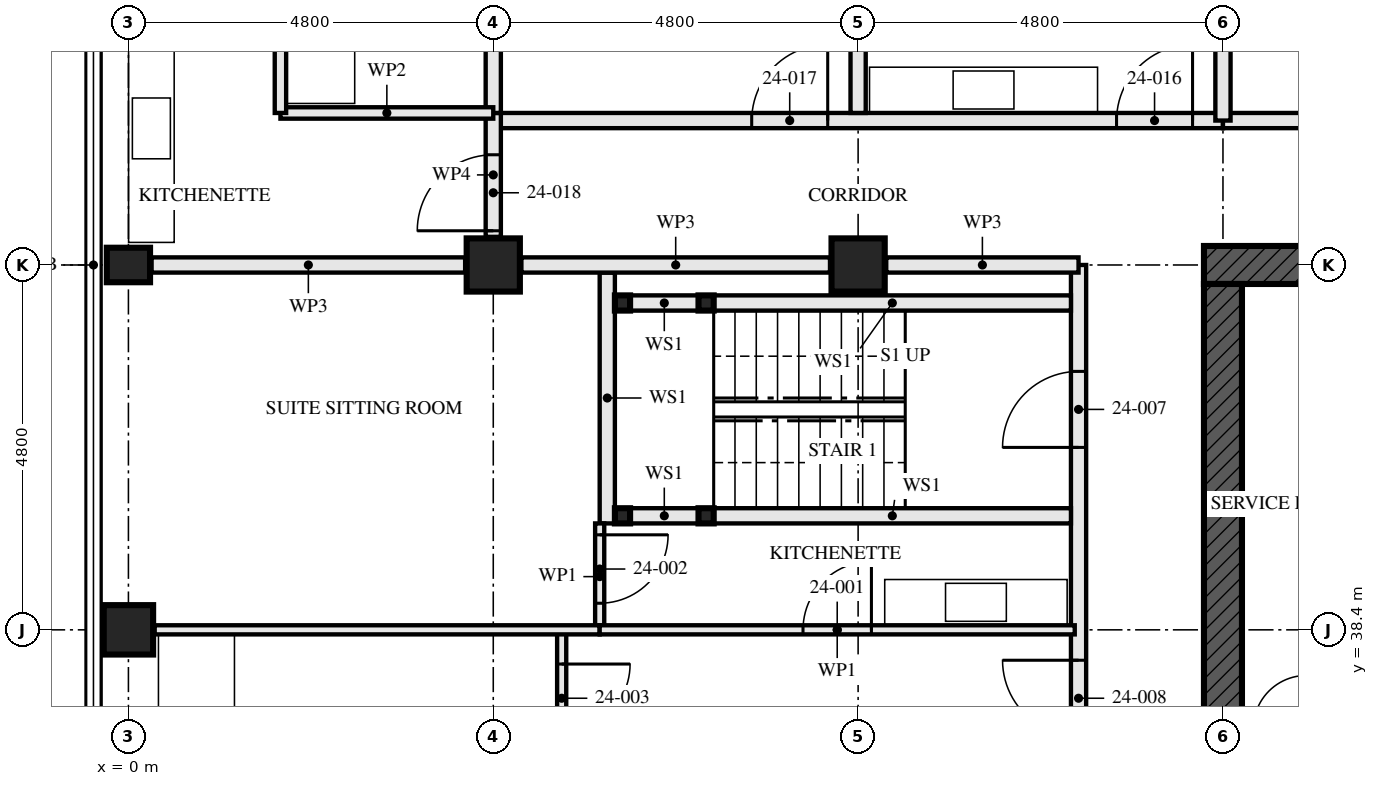
"""IFC4 building model, lengths in metres.
Left out: names, types, materials, properties, quantities, classifications, styles, units other than length and angle.
Written with IfcOpenShell. Run it as: python <this file> out.ifc"""

import sys

from ifc_helpers import new_model, si_unit, direction, frame, frame_2d, origin, origin_2d, place, context, subcontext, project, spatial, rectangle, hollow_rectangle, i_section, extrude, element, fill, save


model = new_model("IFC4")
c1 = context("Model", 3, precision=1e-05, world=origin(), true_north=direction((0.0, 1.0)))
c2 = subcontext(c1, "Body", "Model", "MODEL_VIEW")
j1 = project(units=[si_unit("LENGTHUNIT", "METRE"), si_unit("PLANEANGLEUNIT", "RADIAN")], contexts=[c1])
p1 = place(None, origin())
s1 = spatial("IfcSite", under=j1, at=p1, CompositionType="ELEMENT")
p2 = place(p1, origin())
s2 = spatial("IfcBuilding", under=s1, at=p2, CompositionType="ELEMENT")
p3 = place(p2, frame((0.0, 0.0, 91.0)))
s3 = spatial("IfcBuildingStorey", under=s2, at=p3, CompositionType="ELEMENT", Elevation=91.0)
p4 = place(p3, frame((0.0, 38.4, 0.0), z_axis=(0.0, 0.0, 1.0), x_axis=(1.0, 0.0, 0.0)))
e1 = element("IfcColumn", 1, at=p4, inside=s3, PredefinedType="COLUMN", context=c2, shape_type="SweptSolid", body=[
    extrude(hollow_rectangle(XDim=0.65, YDim=0.65, WallThickness=0.08, at=origin_2d()), origin(), (0.0, 0.0, 1.0), 3.5),
])
p5 = place(p3, frame((0.0, 43.2, 0.0), z_axis=(0.0, 0.0, 1.0), x_axis=(0.0, 1.0, 0.0)))
e2 = element("IfcColumn", 2, at=p5, inside=s3, PredefinedType="COLUMN", context=c2, shape_type="SweptSolid", body=[
    extrude(i_section(OverallWidth=0.454, OverallDepth=0.569, WebThickness=0.078, FlangeThickness=0.125, FilletRadius=0.015, at=origin_2d()), origin(), (0.0, 0.0, 1.0), 3.5),
])
for number, where, z_axis, x_axis in (
    (3, (4.8, 43.2, 0.0), (0.0, 0.0, 1.0), (0.0, 1.0, 0.0)),
    (4, (9.6, 43.2, 0.0), (0.0, 0.0, 1.0), (0.0, 1.0, 0.0)),
):
    element("IfcColumn", number, at=place(p3, frame(where, z_axis=z_axis, x_axis=x_axis)), inside=s3, PredefinedType="COLUMN", context=c2, shape_type="SweptSolid", body=[
        extrude(hollow_rectangle(XDim=0.7, YDim=0.7, WallThickness=0.06, at=origin_2d()), origin(), (0.0, 0.0, 1.0), 3.5),
    ])
p6 = place(p3, frame((29.05, 43.2, -0.17), z_axis=(0.0, 0.0, 1.0), x_axis=(-1.0, 0.0, 0.0)))
e5 = element("IfcWall", 5, at=p6, inside=s3, PredefinedType="SHEAR", context=c2, shape_type="SweptSolid", body=[
    extrude(rectangle(XDim=14.9, YDim=0.5, at=frame_2d((7.45, 0.0))), origin(), (0.0, 0.0, 1.0), 3.5),
])
p7 = place(p6, frame((6.85, 0.0, 0.17)))
e6 = element("IfcOpeningElement", 6, at=p7, cuts=e5, PredefinedType="OPENING", context=c2, shape_type="SweptSolid", body=[
    extrude(rectangle(XDim=1.2, YDim=2.1, at=frame_2d((0.6, 1.05))), frame((0.0, 0.26, 0.0), z_axis=(0.0, -1.0, 0.0), x_axis=(1.0, 0.0, 0.0)), (0.0, 0.0, 1.0), 0.521),
])
p8 = place(p3, frame((14.4, 42.95, -0.17), z_axis=(0.0, 0.0, 1.0), x_axis=(0.0, -1.0, 0.0)))
e7 = element("IfcWall", 7, at=p8, inside=s3, PredefinedType="SHEAR", context=c2, shape_type="SweptSolid", body=[
    extrude(rectangle(XDim=13.9, YDim=0.5, at=frame_2d((6.95, 0.0))), origin(), (0.0, 0.0, 1.0), 3.5),
])
p9 = place(p8, frame((6.35, 0.0, 0.17)))
e8 = element("IfcOpeningElement", 8, at=p9, cuts=e7, PredefinedType="OPENING", context=c2, shape_type="SweptSolid", body=[
    extrude(rectangle(XDim=1.2, YDim=2.1, at=frame_2d((0.6, 1.05))), frame((0.0, 0.26, 0.0), z_axis=(0.0, -1.0, 0.0), x_axis=(1.0, 0.0, 0.0)), (0.0, 0.0, 1.0), 0.521),
])
for number, where, z_axis, x_axis in (
    (9, (6.5, 42.7, 0.0), (0.0, 0.0, 1.0), (1.0, 0.0, 0.0)),
    (10, (6.5, 39.9, 0.0), (0.0, 0.0, 1.0), (1.0, 0.0, 0.0)),
    (11, (7.6, 42.7, 0.0), (0.0, 0.0, 1.0), (1.0, 0.0, 0.0)),
    (12, (7.6, 39.9, 0.0), (0.0, 0.0, 1.0), (1.0, 0.0, 0.0)),
):
    element("IfcColumn", number, at=place(p3, frame(where, z_axis=z_axis, x_axis=x_axis)), inside=s3, PredefinedType="COLUMN", context=c2, shape_type="SweptSolid", body=[
        extrude(hollow_rectangle(XDim=0.2, YDim=0.2, WallThickness=0.008, at=origin_2d()), origin(), (0.0, 0.0, 1.0), 3.33),
    ])
p10 = place(p3, frame((6.6, 42.7, 0.0), z_axis=(0.0, 0.0, 1.0), x_axis=(1.0, 0.0, 0.0)))
e13 = element("IfcWall", 13, at=p10, inside=s3, PredefinedType="SOLIDWALL", context=c2, shape_type="SweptSolid", body=[
    extrude(rectangle(XDim=0.9, YDim=0.2, at=frame_2d((0.45, 0.0))), origin(), (0.0, 0.0, 1.0), 2.99),
])
p11 = place(p3, frame((7.7, 42.7, 0.0), z_axis=(0.0, 0.0, 1.0), x_axis=(1.0, 0.0, 0.0)))
e14 = element("IfcWall", 14, at=p11, inside=s3, PredefinedType="SOLIDWALL", context=c2, shape_type="SweptSolid", body=[
    extrude(rectangle(XDim=4.7, YDim=0.2, at=frame_2d((2.35, 0.0))), origin(), (0.0, 0.0, 1.0), 2.99),
])
p12 = place(p3, frame((6.6, 39.9, 0.0), z_axis=(0.0, 0.0, 1.0), x_axis=(1.0, 0.0, 0.0)))
e15 = element("IfcWall", 15, at=p12, inside=s3, PredefinedType="SOLIDWALL", context=c2, shape_type="SweptSolid", body=[
    extrude(rectangle(XDim=0.9, YDim=0.2, at=frame_2d((0.45, 0.0))), origin(), (0.0, 0.0, 1.0), 2.99),
])
p13 = place(p3, frame((7.7, 39.9, 0.0), z_axis=(0.0, 0.0, 1.0), x_axis=(1.0, 0.0, 0.0)))
e16 = element("IfcWall", 16, at=p13, inside=s3, PredefinedType="SOLIDWALL", context=c2, shape_type="SweptSolid", body=[
    extrude(rectangle(XDim=4.7, YDim=0.2, at=frame_2d((2.35, 0.0))), origin(), (0.0, 0.0, 1.0), 2.99),
])
p14 = place(p3, frame((6.3, 43.1, 0.0), z_axis=(0.0, 0.0, 1.0), x_axis=(0.0, -1.0, 0.0)))
e17 = element("IfcWall", 17, at=p14, inside=s3, PredefinedType="SOLIDWALL", context=c2, shape_type="SweptSolid", body=[
    extrude(rectangle(XDim=3.3, YDim=0.2, at=frame_2d((1.65, 0.0))), origin(), (0.0, 0.0, 1.0), 3.33),
])
p15 = place(p3, frame((6.2, 38.4, 0.0), z_axis=(0.0, 0.0, 1.0), x_axis=(1.0, 0.0, 0.0)))
e18 = element("IfcWall", 18, at=p15, inside=s3, PredefinedType="PARTITIONING", context=c2, shape_type="SweptSolid", body=[
    extrude(rectangle(XDim=6.25, YDim=0.12, at=frame_2d((3.125, 0.0))), origin(), (0.0, 0.0, 1.0), 2.55),
])
p16 = place(p15, frame((2.675, 0.0, 0.0)))
e19 = element("IfcOpeningElement", 19, at=p16, cuts=e18, PredefinedType="OPENING", context=c2, shape_type="SweptSolid", body=[
    extrude(rectangle(XDim=0.9, YDim=2.1, at=frame_2d((0.45, 1.05))), frame((0.0, 0.071, 0.0), z_axis=(0.0, -1.0, 0.0), x_axis=(1.0, 0.0, 0.0)), (0.0, 0.0, 1.0), 0.141),
])
p17 = place(p3, frame((6.2, 39.8, 0.0), z_axis=(0.0, 0.0, 1.0), x_axis=(0.0, -1.0, 0.0)))
e20 = element("IfcWall", 20, at=p17, inside=s3, PredefinedType="PARTITIONING", context=c2, shape_type="SweptSolid", body=[
    extrude(rectangle(XDim=1.4, YDim=0.12, at=frame_2d((0.7, 0.0))), origin(), (0.0, 0.0, 1.0), 3.33),
])
p18 = place(p17, frame((0.15, 0.0, 0.0)))
e21 = element("IfcOpeningElement", 21, at=p18, cuts=e20, PredefinedType="OPENING", context=c2, shape_type="SweptSolid", body=[
    extrude(rectangle(XDim=0.9, YDim=2.1, at=frame_2d((0.45, 1.05))), frame((0.0, 0.071, 0.0), z_axis=(0.0, -1.0, 0.0), x_axis=(1.0, 0.0, 0.0)), (0.0, 0.0, 1.0), 0.141),
])
p19 = place(p3, frame((5.7, 38.4, 0.0), z_axis=(0.0, 0.0, 1.0), x_axis=(0.0, -1.0, 0.0)))
e22 = element("IfcWall", 22, at=p19, inside=s3, PredefinedType="PARTITIONING", context=c2, shape_type="SweptSolid", body=[
    extrude(rectangle(XDim=4.8, YDim=0.12, at=frame_2d((2.4, 0.0))), origin(), (0.0, 0.0, 1.0), 3.33),
])
p20 = place(p19, frame((0.45, 0.0, 0.0)))
e23 = element("IfcOpeningElement", 23, at=p20, cuts=e22, PredefinedType="OPENING", context=c2, shape_type="SweptSolid", body=[
    extrude(rectangle(XDim=0.9, YDim=2.1, at=frame_2d((0.45, 1.05))), frame((0.0, 0.071, 0.0), z_axis=(0.0, -1.0, 0.0), x_axis=(1.0, 0.0, 0.0)), (0.0, 0.0, 1.0), 0.141),
])
p21 = place(p19, frame((2.925, 0.0, 0.0)))
e24 = element("IfcOpeningElement", 24, at=p21, cuts=e22, PredefinedType="OPENING", context=c2, shape_type="SweptSolid", body=[
    extrude(rectangle(XDim=0.95, YDim=2.1, at=frame_2d((0.475, 1.05))), frame((0.0, 0.071, 0.0), z_axis=(0.0, -1.0, 0.0), x_axis=(1.0, 0.0, 0.0)), (0.0, 0.0, 1.0), 0.141),
])
p22 = place(p3, frame((0.345, 38.4, 0.0), z_axis=(0.0, 0.0, 1.0), x_axis=(1.0, 0.0, 0.0)))
e25 = element("IfcWall", 25, at=p22, inside=s3, PredefinedType="PARTITIONING", context=c2, shape_type="SweptSolid", body=[
    extrude(rectangle(XDim=5.855, YDim=0.12, at=frame_2d((2.927, 0.0))), origin(), (0.0, 0.0, 1.0), 2.55),
])
p23 = place(p3, frame((12.5, 43.2, 0.0), z_axis=(0.0, 0.0, 1.0), x_axis=(0.0, -1.0, 0.0)))
e26 = element("IfcWall", 26, at=p23, inside=s3, PredefinedType="PARTITIONING", context=c2, shape_type="SweptSolid", body=[
    extrude(rectangle(XDim=14.84, YDim=0.2, at=frame_2d((7.42, 0.0))), origin(), (0.0, 0.0, 1.0), 2.32),
])
p24 = place(p23, frame((1.4, 0.0, 0.0)))
e27 = element("IfcOpeningElement", 27, at=p24, cuts=e26, PredefinedType="OPENING", context=c2, shape_type="SweptSolid", body=[
    extrude(rectangle(XDim=1.0, YDim=2.1, at=frame_2d((0.5, 1.05))), frame((0.0, 0.111, 0.0), z_axis=(0.0, -1.0, 0.0), x_axis=(1.0, 0.0, 0.0)), (0.0, 0.0, 1.0), 0.221),
])
p25 = place(p23, frame((5.2, 0.0, 0.0)))
e28 = element("IfcOpeningElement", 28, at=p25, cuts=e26, PredefinedType="OPENING", context=c2, shape_type="SweptSolid", body=[
    extrude(rectangle(XDim=1.0, YDim=2.1, at=frame_2d((0.5, 1.05))), frame((0.0, 0.111, 0.0), z_axis=(0.0, -1.0, 0.0), x_axis=(1.0, 0.0, 0.0)), (0.0, 0.0, 1.0), 0.221),
])
p26 = place(p23, frame((13.0, 0.0, 0.0)))
e29 = element("IfcOpeningElement", 29, at=p26, cuts=e26, PredefinedType="OPENING", context=c2, shape_type="SweptSolid", body=[
    extrude(rectangle(XDim=1.0, YDim=2.1, at=frame_2d((0.5, 1.05))), frame((0.0, 0.111, 0.0), z_axis=(0.0, -1.0, 0.0), x_axis=(1.0, 0.0, 0.0)), (0.0, 0.0, 1.0), 0.221),
])
p27 = place(p3, frame((9.6, 57.353, 0.0), z_axis=(0.0, 0.0, 1.0), x_axis=(0.0, -1.0, 0.0)))
e30 = element("IfcWall", 30, at=p27, inside=s3, PredefinedType="PARTITIONING", context=c2, shape_type="SweptSolid", body=[
    extrude(rectangle(XDim=12.153, YDim=0.2, at=frame_2d((6.077, 0.0))), origin(), (0.0, 0.0, 1.0), 2.55),
])
p28 = place(p3, frame((4.8, 52.48, 0.0), z_axis=(0.0, 0.0, 1.0), x_axis=(0.0, -1.0, 0.0)))
e31 = element("IfcWall", 31, at=p28, inside=s3, PredefinedType="PARTITIONING", context=c2, shape_type="SweptSolid", body=[
    extrude(rectangle(XDim=7.28, YDim=0.2, at=frame_2d((3.64, 0.0))), origin(), (0.0, 0.0, 1.0), 2.55),
])
p29 = place(p3, frame((2.0, 48.2, 0.0), z_axis=(0.0, 0.0, 1.0), x_axis=(0.0, -1.0, 0.0)))
e32 = element("IfcWall", 32, at=p29, inside=s3, PredefinedType="PARTITIONING", context=c2, shape_type="SweptSolid", body=[
    extrude(rectangle(XDim=3.0, YDim=0.15, at=frame_2d((1.5, 0.0))), origin(), (0.0, 0.0, 1.0), 2.55),
])
p30 = place(p3, frame((4.8, 45.2, 0.0), z_axis=(0.0, 0.0, 1.0), x_axis=(-1.0, 0.0, 0.0)))
e33 = element("IfcWall", 33, at=p30, inside=s3, PredefinedType="PARTITIONING", context=c2, shape_type="SweptSolid", body=[
    extrude(rectangle(XDim=2.8, YDim=0.15, at=frame_2d((1.4, 0.0))), origin(), (0.0, 0.0, 1.0), 3.33),
])
p31 = place(p3, frame((14.4, 45.1, 0.0), z_axis=(0.0, 0.0, 1.0), x_axis=(-1.0, 0.0, 0.0)))
e34 = element("IfcWall", 34, at=p31, inside=s3, PredefinedType="PARTITIONING", context=c2, shape_type="SweptSolid", body=[
    extrude(rectangle(XDim=9.6, YDim=0.2, at=frame_2d((4.8, 0.0))), origin(), (0.0, 0.0, 1.0), 3.33),
])
p32 = place(p31, frame((0.4, 0.0, 0.0)))
e35 = element("IfcOpeningElement", 35, at=p32, cuts=e34, PredefinedType="OPENING", context=c2, shape_type="SweptSolid", body=[
    extrude(rectangle(XDim=1.0, YDim=2.1, at=frame_2d((0.5, 1.05))), frame((0.0, 0.111, 0.0), z_axis=(0.0, -1.0, 0.0), x_axis=(1.0, 0.0, 0.0)), (0.0, 0.0, 1.0), 0.221),
])
p33 = place(p31, frame((5.2, 0.0, 0.0)))
e36 = element("IfcOpeningElement", 36, at=p33, cuts=e34, PredefinedType="OPENING", context=c2, shape_type="SweptSolid", body=[
    extrude(rectangle(XDim=1.0, YDim=2.1, at=frame_2d((0.5, 1.05))), frame((0.0, 0.111, 0.0), z_axis=(0.0, -1.0, 0.0), x_axis=(1.0, 0.0, 0.0)), (0.0, 0.0, 1.0), 0.221),
])
p34 = place(p3, frame((4.8, 45.2, 0.0), z_axis=(0.0, 0.0, 1.0), x_axis=(0.0, -1.0, 0.0)))
e37 = element("IfcWall", 37, at=p34, inside=s3, PredefinedType="PARTITIONING", context=c2, shape_type="SweptSolid", body=[
    extrude(rectangle(XDim=1.63, YDim=0.2, at=frame_2d((0.815, 0.0))), origin(), (0.0, 0.0, 1.0), 3.33),
])
p35 = place(p34, frame((0.55, 0.0, 0.0)))
e38 = element("IfcOpeningElement", 38, at=p35, cuts=e37, PredefinedType="OPENING", context=c2, shape_type="SweptSolid", body=[
    extrude(rectangle(XDim=1.0, YDim=2.1, at=frame_2d((0.5, 1.05))), frame((0.0, 0.111, 0.0), z_axis=(0.0, -1.0, 0.0), x_axis=(1.0, 0.0, 0.0)), (0.0, 0.0, 1.0), 0.221),
])
p36 = place(p3, frame((29.24, 45.1, 0.0), z_axis=(0.0, 0.0, 1.0), x_axis=(-1.0, 0.0, 0.0)))
e39 = element("IfcWall", 39, at=p36, inside=s3, PredefinedType="PARTITIONING", context=c2, shape_type="SweptSolid", body=[
    extrude(rectangle(XDim=14.84, YDim=0.2, at=frame_2d((7.42, 0.0))), origin(), (0.0, 0.0, 1.0), 2.32),
])
p37 = place(p36, frame((0.84, 0.0, 0.0)))
e40 = element("IfcOpeningElement", 40, at=p37, cuts=e39, PredefinedType="OPENING", context=c2, shape_type="SweptSolid", body=[
    extrude(rectangle(XDim=1.0, YDim=2.1, at=frame_2d((0.5, 1.05))), frame((0.0, 0.111, 0.0), z_axis=(0.0, -1.0, 0.0), x_axis=(1.0, 0.0, 0.0)), (0.0, 0.0, 1.0), 0.221),
])
p38 = place(p36, frame((5.64, 0.0, 0.0)))
e41 = element("IfcOpeningElement", 41, at=p38, cuts=e39, PredefinedType="OPENING", context=c2, shape_type="SweptSolid", body=[
    extrude(rectangle(XDim=1.0, YDim=2.1, at=frame_2d((0.5, 1.05))), frame((0.0, 0.111, 0.0), z_axis=(0.0, -1.0, 0.0), x_axis=(1.0, 0.0, 0.0)), (0.0, 0.0, 1.0), 0.221),
])
p39 = place(p36, frame((10.44, 0.0, 0.0)))
e42 = element("IfcOpeningElement", 42, at=p39, cuts=e39, PredefinedType="OPENING", context=c2, shape_type="SweptSolid", body=[
    extrude(rectangle(XDim=1.0, YDim=2.1, at=frame_2d((0.5, 1.05))), frame((0.0, 0.111, 0.0), z_axis=(0.0, -1.0, 0.0), x_axis=(1.0, 0.0, 0.0)), (0.0, 0.0, 1.0), 0.221),
])
p40 = place(p3, frame((12.5, 43.2, 0.0), z_axis=(0.0, 0.0, 1.0), x_axis=(-1.0, 0.0, 0.0)))
e43 = element("IfcWall", 43, at=p40, inside=s3, PredefinedType="PARTITIONING", context=c2, shape_type="SweptSolid", body=[
    extrude(rectangle(XDim=2.53, YDim=0.2, at=frame_2d((1.265, 0.0))), origin(), (0.0, 0.0, 1.0), 2.32),
])
p41 = place(p3, frame((9.23, 43.2, 0.0), z_axis=(0.0, 0.0, 1.0), x_axis=(-1.0, 0.0, 0.0)))
e44 = element("IfcWall", 44, at=p41, inside=s3, PredefinedType="PARTITIONING", context=c2, shape_type="SweptSolid", body=[
    extrude(rectangle(XDim=4.06, YDim=0.2, at=frame_2d((2.03, 0.0))), origin(), (0.0, 0.0, 1.0), 2.32),
])
p42 = place(p3, frame((4.43, 43.2, 0.0), z_axis=(0.0, 0.0, 1.0), x_axis=(-1.0, 0.0, 0.0)))
e45 = element("IfcWall", 45, at=p42, inside=s3, PredefinedType="PARTITIONING", context=c2, shape_type="SweptSolid", body=[
    extrude(rectangle(XDim=4.125, YDim=0.2, at=frame_2d((2.063, 0.0))), origin(), (0.0, 0.0, 1.0), 2.32),
])
p43 = place(p3, frame((14.4, 45.1, 0.0), z_axis=(0.0, 0.0, 1.0), x_axis=(0.0, 1.0, 0.0)))
e46 = element("IfcWall", 46, at=p43, inside=s3, PredefinedType="PARTITIONING", context=c2, shape_type="SweptSolid", body=[
    extrude(rectangle(XDim=2.605, YDim=0.2, at=frame_2d((1.302, 0.0))), origin(), (0.0, 0.0, 1.0), 2.32),
])
p44 = place(p16, origin())
e47 = element("IfcDoor", 47, at=p44, inside=s3, OperationType="SINGLE_SWING_LEFT", PredefinedType="DOOR", context=c2, shape_type="SweptSolid", body=[
    extrude(rectangle(XDim=0.9, YDim=2.1, at=frame_2d((0.45, 1.05))), frame((0.0, 0.022, 0.0), z_axis=(0.0, -1.0, 0.0), x_axis=(1.0, 0.0, 0.0)), (0.0, 0.0, 1.0), 0.044),
])
fill(e19, e47)
p45 = place(p18, origin())
e48 = element("IfcDoor", 48, at=p45, inside=s3, OperationType="SINGLE_SWING_RIGHT", PredefinedType="DOOR", context=c2, shape_type="SweptSolid", body=[
    extrude(rectangle(XDim=0.9, YDim=2.1, at=frame_2d((0.45, 1.05))), frame((0.0, 0.022, 0.0), z_axis=(0.0, -1.0, 0.0), x_axis=(1.0, 0.0, 0.0)), (0.0, 0.0, 1.0), 0.044),
])
fill(e21, e48)
p46 = place(p20, origin())
e49 = element("IfcDoor", 49, at=p46, inside=s3, OperationType="SINGLE_SWING_RIGHT", PredefinedType="DOOR", context=c2, shape_type="SweptSolid", body=[
    extrude(rectangle(XDim=0.9, YDim=2.1, at=frame_2d((0.45, 1.05))), frame((0.0, 0.022, 0.0), z_axis=(0.0, -1.0, 0.0), x_axis=(1.0, 0.0, 0.0)), (0.0, 0.0, 1.0), 0.044),
])
fill(e23, e49)
p47 = place(p24, frame((1.0, 0.0, 0.0), z_axis=(0.0, 0.0, 1.0), x_axis=(-1.0, 0.0, 0.0)))
e50 = element("IfcDoor", 50, at=p47, inside=s3, OperationType="SINGLE_SWING_RIGHT", PredefinedType="DOOR", context=c2, shape_type="SweptSolid", body=[
    extrude(rectangle(XDim=1.0, YDim=2.1, at=frame_2d((0.5, 1.05))), frame((0.0, 0.032, 0.0), z_axis=(0.0, -1.0, 0.0), x_axis=(1.0, 0.0, 0.0)), (0.0, 0.0, 1.0), 0.064),
])
fill(e27, e50)
p48 = place(p25, frame((1.0, 0.0, 0.0), z_axis=(0.0, 0.0, 1.0), x_axis=(-1.0, 0.0, 0.0)))
e51 = element("IfcDoor", 51, at=p48, inside=s3, OperationType="SINGLE_SWING_LEFT", PredefinedType="DOOR", context=c2, shape_type="SweptSolid", body=[
    extrude(rectangle(XDim=1.0, YDim=2.1, at=frame_2d((0.5, 1.05))), frame((0.0, 0.027, 0.0), z_axis=(0.0, -1.0, 0.0), x_axis=(1.0, 0.0, 0.0)), (0.0, 0.0, 1.0), 0.054),
])
fill(e28, e51)
p49 = place(p32, frame((1.0, 0.0, 0.0), z_axis=(0.0, 0.0, 1.0), x_axis=(-1.0, 0.0, 0.0)))
e52 = element("IfcDoor", 52, at=p49, inside=s3, OperationType="SINGLE_SWING_LEFT", PredefinedType="DOOR", context=c2, shape_type="SweptSolid", body=[
    extrude(rectangle(XDim=1.0, YDim=2.1, at=frame_2d((0.5, 1.05))), frame((0.0, 0.027, 0.0), z_axis=(0.0, -1.0, 0.0), x_axis=(1.0, 0.0, 0.0)), (0.0, 0.0, 1.0), 0.054),
])
fill(e35, e52)
p50 = place(p33, frame((1.0, 0.0, 0.0), z_axis=(0.0, 0.0, 1.0), x_axis=(-1.0, 0.0, 0.0)))
e53 = element("IfcDoor", 53, at=p50, inside=s3, OperationType="SINGLE_SWING_LEFT", PredefinedType="DOOR", context=c2, shape_type="SweptSolid", body=[
    extrude(rectangle(XDim=1.0, YDim=2.1, at=frame_2d((0.5, 1.05))), frame((0.0, 0.027, 0.0), z_axis=(0.0, -1.0, 0.0), x_axis=(1.0, 0.0, 0.0)), (0.0, 0.0, 1.0), 0.054),
])
fill(e36, e53)
p51 = place(p35, frame((1.0, 0.0, 0.0), z_axis=(0.0, 0.0, 1.0), x_axis=(-1.0, 0.0, 0.0)))
e54 = element("IfcDoor", 54, at=p51, inside=s3, OperationType="SINGLE_SWING_RIGHT", PredefinedType="DOOR", context=c2, shape_type="SweptSolid", body=[
    extrude(rectangle(XDim=1.0, YDim=2.1, at=frame_2d((0.5, 1.05))), frame((0.0, 0.027, 0.0), z_axis=(0.0, -1.0, 0.0), x_axis=(1.0, 0.0, 0.0)), (0.0, 0.0, 1.0), 0.054),
])
fill(e38, e54)
save(model, sys.argv[1])
